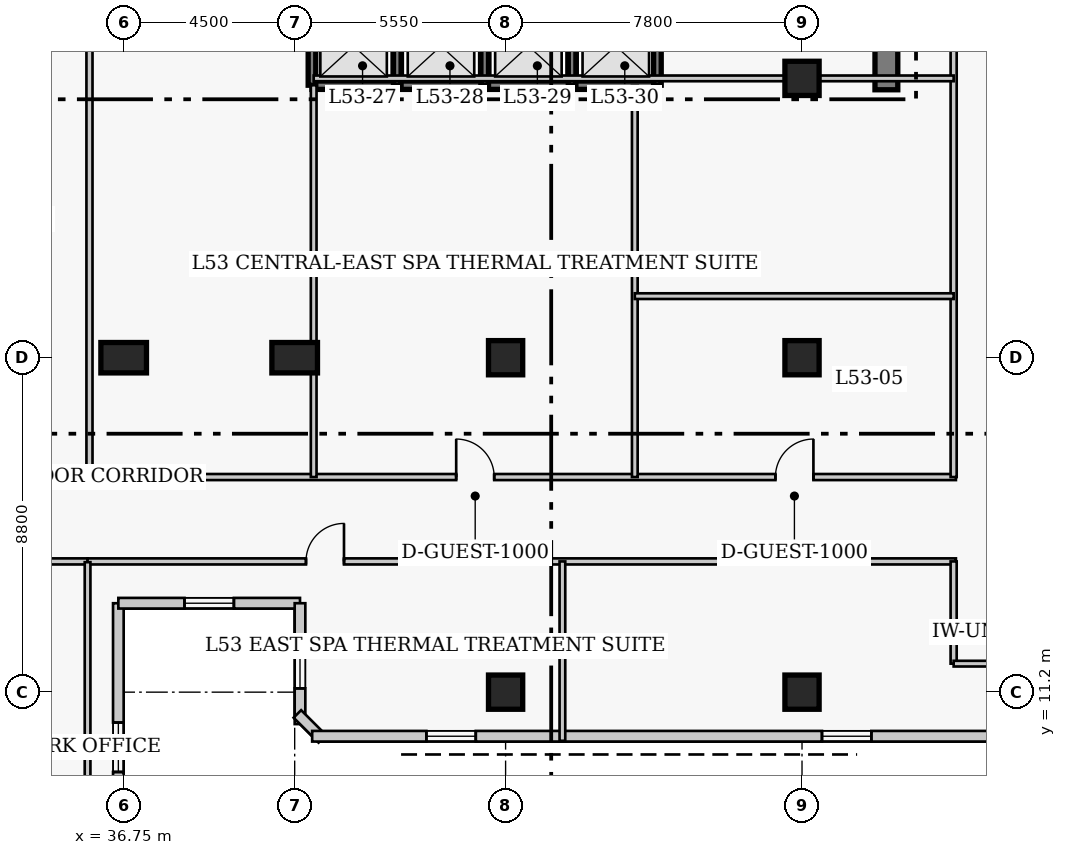
"""IFC4 building model, lengths in metres.
Left out: names, types, materials, properties, quantities, classifications, styles, units other than length and angle.
Written with IfcOpenShell. Run it as: python <this file> out.ifc"""

import sys

from ifc_helpers import new_model, si_unit, direction, frame, frame_2d, origin, origin_2d, place, context, subcontext, project, spatial, rectangle, extrude, element, fill, save


model = new_model("IFC4")
c1 = context("Model", 3, precision=1e-05, world=origin(), true_north=direction((0.0, 1.0)))
c2 = subcontext(c1, "Body", "Model", "MODEL_VIEW")
j1 = project(units=[si_unit("LENGTHUNIT", "METRE"), si_unit("PLANEANGLEUNIT", "RADIAN")], contexts=[c1])
p1 = place(None, origin())
s1 = spatial("IfcSite", under=j1, at=p1, CompositionType="ELEMENT")
p2 = place(p1, origin())
s2 = spatial("IfcBuilding", under=s1, at=p2, CompositionType="ELEMENT")
p3 = place(p2, frame((0.0, 0.0, 212.4)))
s3 = spatial("IfcBuildingStorey", under=s2, at=p3, CompositionType="ELEMENT", Elevation=212.4)
p4 = place(p3, frame((56.82, 27.05, 0.0), z_axis=(0.0, 0.0, 1.0), x_axis=(0.0, 1.0, 0.0)))
e1 = element("IfcWall", 1, at=p4, inside=s3, PredefinedType="SHEAR", context=c2, shape_type="SweptSolid", body=[
    extrude(rectangle(XDim=13.57, YDim=0.6, at=frame_2d((6.785, 0.0))), origin(), (0.0, 0.0, 1.0), 3.9),
])
for number, where, z_axis, x_axis in (
    (2, (36.75, 20.0, 0.0), (0.0, 0.0, 1.0), (1.0, 0.0, 0.0)),
    (3, (41.25, 20.0, 0.0), (0.0, 0.0, 1.0), (1.0, 0.0, 0.0)),
):
    element("IfcColumn", number, at=place(p3, frame(where, z_axis=z_axis, x_axis=x_axis)), inside=s3, PredefinedType="COLUMN", context=c2, shape_type="SweptSolid", body=[
        extrude(rectangle(XDim=1.2, YDim=0.8, at=origin_2d()), origin(), (0.0, 0.0, 1.0), 3.9),
    ])
for number, where, z_axis, x_axis in (
    (4, (46.8, 11.2, 0.0), (0.0, 0.0, 1.0), (1.0, 0.0, 0.0)),
    (5, (46.8, 20.0, 0.0), (0.0, 0.0, 1.0), (1.0, 0.0, 0.0)),
    (6, (54.6, 11.2, 0.0), (0.0, 0.0, 1.0), (1.0, 0.0, 0.0)),
    (7, (54.6, 20.0, 0.0), (0.0, 0.0, 1.0), (1.0, 0.0, 0.0)),
    (8, (54.6, 27.35, 0.0), (0.0, 0.0, 1.0), (1.0, 0.0, 0.0)),
):
    element("IfcColumn", number, at=place(p3, frame(where, z_axis=z_axis, x_axis=x_axis)), inside=s3, PredefinedType="COLUMN", context=c2, shape_type="SweptSolid", body=[
        extrude(rectangle(XDim=0.9, YDim=0.9, at=origin_2d()), origin(), (0.0, 0.0, 1.0), 3.9),
    ])
p5 = place(p3, frame((36.61, 5.96, 0.0), z_axis=(0.0, 0.0, 1.0), x_axis=(0.0, 1.0, 0.0)))
e9 = element("IfcWall", 9, at=p5, inside=s3, PredefinedType="SOLIDWALL", context=c2, shape_type="SweptSolid", body=[
    extrude(rectangle(XDim=7.58, YDim=0.28, at=frame_2d((3.79, 0.0))), origin(), (0.0, 0.0, 1.0), 3.65),
])
p6 = place(p5, frame((3.14, 0.0, 0.85)))
e10 = element("IfcOpeningElement", 10, at=p6, cuts=e9, PredefinedType="OPENING", context=c2, shape_type="SweptSolid", body=[
    extrude(rectangle(XDim=1.3, YDim=1.7, at=frame_2d((0.65, 0.85))), frame((0.0, 0.15, 0.0), z_axis=(0.0, -1.0, 0.0), x_axis=(1.0, 0.0, 0.0)), (0.0, 0.0, 1.0), 0.3),
])
p7 = place(p3, frame((36.61, 13.54, 0.0), z_axis=(0.0, 0.0, 1.0), x_axis=(1.0, 0.0, 0.0)))
e11 = element("IfcWall", 11, at=p7, inside=s3, PredefinedType="SOLIDWALL", context=c2, shape_type="SweptSolid", body=[
    extrude(rectangle(XDim=4.78, YDim=0.28, at=frame_2d((2.39, 0.0))), origin(), (0.0, 0.0, 1.0), 3.65),
])
p8 = place(p7, frame((1.74, 0.0, 0.85)))
e12 = element("IfcOpeningElement", 12, at=p8, cuts=e11, PredefinedType="OPENING", context=c2, shape_type="SweptSolid", body=[
    extrude(rectangle(XDim=1.3, YDim=1.7, at=frame_2d((0.65, 0.85))), frame((0.0, 0.15, 0.0), z_axis=(0.0, -1.0, 0.0), x_axis=(1.0, 0.0, 0.0)), (0.0, 0.0, 1.0), 0.3),
])
p9 = place(p3, frame((41.39, 13.54, 0.0), z_axis=(0.0, 0.0, 1.0), x_axis=(0.0, -1.0, 0.0)))
e13 = element("IfcWall", 13, at=p9, inside=s3, PredefinedType="SOLIDWALL", context=c2, shape_type="SweptSolid", body=[
    extrude(rectangle(XDim=3.18, YDim=0.28, at=frame_2d((1.59, 0.0))), origin(), (0.0, 0.0, 1.0), 3.65),
])
p10 = place(p9, frame((0.94, 0.0, 0.85)))
e14 = element("IfcOpeningElement", 14, at=p10, cuts=e13, PredefinedType="OPENING", context=c2, shape_type="SweptSolid", body=[
    extrude(rectangle(XDim=1.3, YDim=1.7, at=frame_2d((0.65, 0.85))), frame((0.0, 0.15, 0.0), z_axis=(0.0, -1.0, 0.0), x_axis=(1.0, 0.0, 0.0)), (0.0, 0.0, 1.0), 0.3),
])
p11 = place(p3, frame((41.321, 10.627, 0.0), z_axis=(0.0, 0.0, 1.0), x_axis=(0.707106781187, -0.707106781187, 0.0)))
e15 = element("IfcWall", 15, at=p11, inside=s3, PredefinedType="SOLIDWALL", context=c2, shape_type="SweptSolid", body=[
    extrude(rectangle(XDim=0.928, YDim=0.28, at=frame_2d((0.464, 0.0))), origin(), (0.0, 0.0, 1.0), 3.65),
])
p12 = place(p3, frame((41.71, 10.04, 0.0), z_axis=(0.0, 0.0, 1.0), x_axis=(1.0, 0.0, 0.0)))
e16 = element("IfcWall", 16, at=p12, inside=s3, PredefinedType="SOLIDWALL", context=c2, shape_type="SweptSolid", body=[
    extrude(rectangle(XDim=25.83, YDim=0.28, at=frame_2d((12.915, 0.0))), origin(), (0.0, 0.0, 1.0), 3.65),
])
p13 = place(p12, frame((3.005, 0.0, 0.85)))
e17 = element("IfcOpeningElement", 17, at=p13, cuts=e16, PredefinedType="OPENING", context=c2, shape_type="SweptSolid", body=[
    extrude(rectangle(XDim=1.3, YDim=1.7, at=frame_2d((0.65, 0.85))), frame((0.0, 0.15, 0.0), z_axis=(0.0, -1.0, 0.0), x_axis=(1.0, 0.0, 0.0)), (0.0, 0.0, 1.0), 0.3),
])
p14 = place(p12, frame((13.415, 0.0, 0.85)))
e18 = element("IfcOpeningElement", 18, at=p14, cuts=e16, PredefinedType="OPENING", context=c2, shape_type="SweptSolid", body=[
    extrude(rectangle(XDim=1.3, YDim=1.7, at=frame_2d((0.65, 0.85))), frame((0.0, 0.15, 0.0), z_axis=(0.0, -1.0, 0.0), x_axis=(1.0, 0.0, 0.0)), (0.0, 0.0, 1.0), 0.3),
])
p15 = place(p12, frame((21.525, 0.0, 0.85)))
e19 = element("IfcOpeningElement", 19, at=p15, cuts=e16, PredefinedType="OPENING", context=c2, shape_type="SweptSolid", body=[
    extrude(rectangle(XDim=1.3, YDim=1.7, at=frame_2d((0.65, 0.85))), frame((0.0, 0.15, 0.0), z_axis=(0.0, -1.0, 0.0), x_axis=(1.0, 0.0, 0.0)), (0.0, 0.0, 1.0), 0.3),
])
p16 = place(p3, frame((41.705, 27.17, 0.0), z_axis=(0.0, 0.0, 1.0), x_axis=(1.0, 0.0, 0.0)))
e20 = element("IfcWall", 20, at=p16, inside=s3, PredefinedType="SHEAR", context=c2, shape_type="SweptSolid", body=[
    extrude(rectangle(XDim=2.245, YDim=0.22, at=frame_2d((1.123, 0.0))), origin(), (0.0, 0.0, 1.0), 3.9),
])
p17 = place(p3, frame((41.705, 27.17, 0.0), z_axis=(0.0, 0.0, 1.0), x_axis=(0.0, 1.0, 0.0)))
e21 = element("IfcWall", 21, at=p17, inside=s3, PredefinedType="SHEAR", context=c2, shape_type="SweptSolid", body=[
    extrude(rectangle(XDim=2.06, YDim=0.2, at=frame_2d((1.03, 0.0))), origin(), (0.0, 0.0, 1.0), 3.9),
])
p18 = place(p3, frame((43.95, 27.17, 0.0), z_axis=(0.0, 0.0, 1.0), x_axis=(1.0, 0.0, 0.0)))
e22 = element("IfcWall", 22, at=p18, inside=s3, PredefinedType="SHEAR", context=c2, shape_type="SweptSolid", body=[
    extrude(rectangle(XDim=2.3, YDim=0.22, at=frame_2d((1.15, 0.0))), origin(), (0.0, 0.0, 1.0), 3.9),
])
p19 = place(p3, frame((43.95, 27.17, 0.0), z_axis=(0.0, 0.0, 1.0), x_axis=(0.0, 1.0, 0.0)))
e23 = element("IfcWall", 23, at=p19, inside=s3, PredefinedType="SHEAR", context=c2, shape_type="SweptSolid", body=[
    extrude(rectangle(XDim=2.06, YDim=0.2, at=frame_2d((1.03, 0.0))), origin(), (0.0, 0.0, 1.0), 3.9),
])
p20 = place(p3, frame((46.25, 27.17, 0.0), z_axis=(0.0, 0.0, 1.0), x_axis=(1.0, 0.0, 0.0)))
e24 = element("IfcWall", 24, at=p20, inside=s3, PredefinedType="SHEAR", context=c2, shape_type="SweptSolid", body=[
    extrude(rectangle(XDim=2.3, YDim=0.22, at=frame_2d((1.15, 0.0))), origin(), (0.0, 0.0, 1.0), 3.9),
])
p21 = place(p3, frame((46.25, 27.17, 0.0), z_axis=(0.0, 0.0, 1.0), x_axis=(0.0, 1.0, 0.0)))
e25 = element("IfcWall", 25, at=p21, inside=s3, PredefinedType="SHEAR", context=c2, shape_type="SweptSolid", body=[
    extrude(rectangle(XDim=2.06, YDim=0.2, at=frame_2d((1.03, 0.0))), origin(), (0.0, 0.0, 1.0), 3.9),
])
p22 = place(p3, frame((48.55, 27.17, 0.0), z_axis=(0.0, 0.0, 1.0), x_axis=(1.0, 0.0, 0.0)))
e26 = element("IfcWall", 26, at=p22, inside=s3, PredefinedType="SHEAR", context=c2, shape_type="SweptSolid", body=[
    extrude(rectangle(XDim=2.245, YDim=0.22, at=frame_2d((1.123, 0.0))), origin(), (0.0, 0.0, 1.0), 3.9),
])
for number, where, z_axis, x_axis in (
    (27, (48.55, 27.17, 0.0), (0.0, 0.0, 1.0), (0.0, 1.0, 0.0)),
    (28, (50.795, 27.17, 0.0), (0.0, 0.0, 1.0), (0.0, 1.0, 0.0)),
):
    element("IfcWall", number, at=place(p3, frame(where, z_axis=z_axis, x_axis=x_axis)), inside=s3, PredefinedType="SHEAR", context=c2, shape_type="SweptSolid", body=[
        extrude(rectangle(XDim=2.06, YDim=0.2, at=frame_2d((1.03, 0.0))), origin(), (0.0, 0.0, 1.0), 3.9),
    ])
p23 = place(p3, frame((35.85, 16.86, 0.0), z_axis=(0.0, 0.0, 1.0), x_axis=(1.0, 0.0, 0.0)))
e29 = element("IfcWall", 29, at=p23, inside=s3, PredefinedType="PARTITIONING", context=c2, shape_type="SweptSolid", body=[
    extrude(rectangle(XDim=22.8, YDim=0.16, at=frame_2d((11.4, 0.0))), origin(), (0.0, 0.0, 1.0), 3.65),
])
p24 = place(p23, frame((9.65, 0.0, 0.0)))
e30 = element("IfcOpeningElement", 30, at=p24, cuts=e29, PredefinedType="OPENING", context=c2, shape_type="SweptSolid", body=[
    extrude(rectangle(XDim=1.0, YDim=2.15, at=frame_2d((0.5, 1.075))), frame((0.0, 0.09, 0.0), z_axis=(0.0, -1.0, 0.0), x_axis=(1.0, 0.0, 0.0)), (0.0, 0.0, 1.0), 0.18),
])
p25 = place(p23, frame((18.05, 0.0, 0.0)))
e31 = element("IfcOpeningElement", 31, at=p25, cuts=e29, PredefinedType="OPENING", context=c2, shape_type="SweptSolid", body=[
    extrude(rectangle(XDim=1.0, YDim=2.15, at=frame_2d((0.5, 1.075))), frame((0.0, 0.09, 0.0), z_axis=(0.0, -1.0, 0.0), x_axis=(1.0, 0.0, 0.0)), (0.0, 0.0, 1.0), 0.18),
])
p26 = place(p3, frame((35.85, 16.86, 0.0), z_axis=(0.0, 0.0, 1.0), x_axis=(0.0, 1.0, 0.0)))
e32 = element("IfcWall", 32, at=p26, inside=s3, PredefinedType="PARTITIONING", context=c2, shape_type="SweptSolid", body=[
    extrude(rectangle(XDim=12.69, YDim=0.16, at=frame_2d((6.345, 0.0))), origin(), (0.0, 0.0, 1.0), 3.65),
])
p27 = place(p3, frame((18.8, 14.64, 0.0), z_axis=(0.0, 0.0, 1.0), x_axis=(1.0, 0.0, 0.0)))
e33 = element("IfcWall", 33, at=p27, inside=s3, PredefinedType="PARTITIONING", context=c2, shape_type="SweptSolid", body=[
    extrude(rectangle(XDim=17.0, YDim=0.16, at=frame_2d((8.5, 0.0))), origin(), (0.0, 0.0, 1.0), 3.65),
])
p28 = place(p27, frame((4.95, 0.0, 0.0)))
e34 = element("IfcOpeningElement", 34, at=p28, cuts=e33, PredefinedType="OPENING", context=c2, shape_type="SweptSolid", body=[
    extrude(rectangle(XDim=1.0, YDim=2.15, at=frame_2d((0.5, 1.075))), frame((0.0, 0.09, 0.0), z_axis=(0.0, -1.0, 0.0), x_axis=(1.0, 0.0, 0.0)), (0.0, 0.0, 1.0), 0.18),
])
p29 = place(p27, frame((12.265, 0.0, 0.0)))
e35 = element("IfcOpeningElement", 35, at=p29, cuts=e33, PredefinedType="OPENING", context=c2, shape_type="SweptSolid", body=[
    extrude(rectangle(XDim=1.0, YDim=2.15, at=frame_2d((0.5, 1.075))), frame((0.0, 0.09, 0.0), z_axis=(0.0, -1.0, 0.0), x_axis=(1.0, 0.0, 0.0)), (0.0, 0.0, 1.0), 0.18),
])
p30 = place(p3, frame((35.8, 14.64, 0.0), z_axis=(0.0, 0.0, 1.0), x_axis=(1.0, 0.0, 0.0)))
e36 = element("IfcWall", 36, at=p30, inside=s3, PredefinedType="PARTITIONING", context=c2, shape_type="SweptSolid", body=[
    extrude(rectangle(XDim=22.85, YDim=0.16, at=frame_2d((11.425, 0.0))), origin(), (0.0, 0.0, 1.0), 3.65),
])
p31 = place(p30, frame((5.748, 0.0, 0.0)))
e37 = element("IfcOpeningElement", 37, at=p31, cuts=e36, PredefinedType="OPENING", context=c2, shape_type="SweptSolid", body=[
    extrude(rectangle(XDim=1.0, YDim=2.15, at=frame_2d((0.5, 1.075))), frame((0.0, 0.09, 0.0), z_axis=(0.0, -1.0, 0.0), x_axis=(1.0, 0.0, 0.0)), (0.0, 0.0, 1.0), 0.18),
])
p32 = place(p3, frame((58.59, 16.86, 0.0), z_axis=(0.0, 0.0, 1.0), x_axis=(0.0, 1.0, 0.0)))
e38 = element("IfcWall", 38, at=p32, inside=s3, PredefinedType="PARTITIONING", context=c2, shape_type="SweptSolid", body=[
    extrude(rectangle(XDim=23.79, YDim=0.16, at=frame_2d((11.895, 0.0))), origin(), (0.0, 0.0, 1.0), 3.246),
])
p33 = place(p3, frame((58.59, 11.95, 0.0), z_axis=(0.0, 0.0, 1.0), x_axis=(0.0, 1.0, 0.0)))
e39 = element("IfcWall", 39, at=p33, inside=s3, PredefinedType="PARTITIONING", context=c2, shape_type="SweptSolid", body=[
    extrude(rectangle(XDim=2.69, YDim=0.16, at=frame_2d((1.345, 0.0))), origin(), (0.0, 0.0, 1.0), 3.246),
])
p34 = place(p3, frame((58.59, 11.95, 0.0), z_axis=(0.0, 0.0, 1.0), x_axis=(1.0, 0.0, 0.0)))
e40 = element("IfcWall", 40, at=p34, inside=s3, PredefinedType="PARTITIONING", context=c2, shape_type="SweptSolid", body=[
    extrude(rectangle(XDim=2.22, YDim=0.15, at=frame_2d((1.11, 0.0))), origin(), (0.0, 0.0, 1.0), 3.65),
])
p35 = place(p3, frame((41.75, 16.86, 0.0), z_axis=(0.0, 0.0, 1.0), x_axis=(0.0, 1.0, 0.0)))
e41 = element("IfcWall", 41, at=p35, inside=s3, PredefinedType="PARTITIONING", context=c2, shape_type="SweptSolid", body=[
    extrude(rectangle(XDim=10.31, YDim=0.15, at=frame_2d((5.155, 0.0))), origin(), (0.0, 0.0, 1.0), 3.65),
])
p36 = place(p3, frame((50.2, 16.86, 0.0), z_axis=(0.0, 0.0, 1.0), x_axis=(0.0, 1.0, 0.0)))
e42 = element("IfcWall", 42, at=p36, inside=s3, PredefinedType="PARTITIONING", context=c2, shape_type="SweptSolid", body=[
    extrude(rectangle(XDim=10.29, YDim=0.15, at=frame_2d((5.145, 0.0))), origin(), (0.0, 0.0, 1.0), 3.65),
])
p37 = place(p3, frame((41.75, 27.35, 0.0), z_axis=(0.0, 0.0, 1.0), x_axis=(1.0, 0.0, 0.0)))
e43 = element("IfcWall", 43, at=p37, inside=s3, PredefinedType="PARTITIONING", context=c2, shape_type="SweptSolid", body=[
    extrude(rectangle(XDim=16.84, YDim=0.15, at=frame_2d((8.42, 0.0))), origin(), (0.0, 0.0, 1.0), 3.65),
])
p38 = place(p3, frame((50.2, 21.62, 0.0), z_axis=(0.0, 0.0, 1.0), x_axis=(1.0, 0.0, 0.0)))
e44 = element("IfcWall", 44, at=p38, inside=s3, PredefinedType="PARTITIONING", context=c2, shape_type="SweptSolid", body=[
    extrude(rectangle(XDim=8.39, YDim=0.15, at=frame_2d((4.195, 0.0))), origin(), (0.0, 0.0, 1.0), 3.65),
])
p39 = place(p3, frame((35.8, 5.52, 0.0), z_axis=(0.0, 0.0, 1.0), x_axis=(0.0, 1.0, 0.0)))
e45 = element("IfcWall", 45, at=p39, inside=s3, PredefinedType="PARTITIONING", context=c2, shape_type="SweptSolid", body=[
    extrude(rectangle(XDim=9.1, YDim=0.15, at=frame_2d((4.55, 0.0))), origin(), (0.0, 0.0, 1.0), 3.65),
])
p40 = place(p3, frame((48.295, 9.92, 0.0), z_axis=(0.0, 0.0, 1.0), x_axis=(0.0, 1.0, 0.0)))
e46 = element("IfcWall", 46, at=p40, inside=s3, PredefinedType="PARTITIONING", context=c2, shape_type="SweptSolid", body=[
    extrude(rectangle(XDim=4.72, YDim=0.15, at=frame_2d((2.36, 0.0))), origin(), (0.0, 0.0, 1.0), 3.65),
])
p41 = place(p6, origin())
e47 = element("IfcWindow", 47, at=p41, inside=s3, PartitioningType="SINGLE_PANEL", PredefinedType="WINDOW", context=c2, shape_type="SweptSolid", body=[
    extrude(rectangle(XDim=1.3, YDim=1.7, at=frame_2d((0.65, 0.85))), frame((0.0, 0.03, 0.0), z_axis=(0.0, -1.0, 0.0), x_axis=(1.0, 0.0, 0.0)), (0.0, 0.0, 1.0), 0.06),
])
fill(e10, e47)
p42 = place(p8, origin())
e48 = element("IfcWindow", 48, at=p42, inside=s3, PartitioningType="SINGLE_PANEL", PredefinedType="WINDOW", context=c2, shape_type="SweptSolid", body=[
    extrude(rectangle(XDim=1.3, YDim=1.7, at=frame_2d((0.65, 0.85))), frame((0.0, 0.03, 0.0), z_axis=(0.0, -1.0, 0.0), x_axis=(1.0, 0.0, 0.0)), (0.0, 0.0, 1.0), 0.06),
])
fill(e12, e48)
p43 = place(p10, origin())
e49 = element("IfcWindow", 49, at=p43, inside=s3, PartitioningType="SINGLE_PANEL", PredefinedType="WINDOW", context=c2, shape_type="SweptSolid", body=[
    extrude(rectangle(XDim=1.3, YDim=1.7, at=frame_2d((0.65, 0.85))), frame((0.0, 0.03, 0.0), z_axis=(0.0, -1.0, 0.0), x_axis=(1.0, 0.0, 0.0)), (0.0, 0.0, 1.0), 0.06),
])
fill(e14, e49)
p44 = place(p13, origin())
e50 = element("IfcWindow", 50, at=p44, inside=s3, PartitioningType="SINGLE_PANEL", PredefinedType="WINDOW", context=c2, shape_type="SweptSolid", body=[
    extrude(rectangle(XDim=1.3, YDim=1.7, at=frame_2d((0.65, 0.85))), frame((0.0, 0.03, 0.0), z_axis=(0.0, -1.0, 0.0), x_axis=(1.0, 0.0, 0.0)), (0.0, 0.0, 1.0), 0.06),
])
fill(e17, e50)
p45 = place(p14, origin())
e51 = element("IfcWindow", 51, at=p45, inside=s3, PartitioningType="SINGLE_PANEL", PredefinedType="WINDOW", context=c2, shape_type="SweptSolid", body=[
    extrude(rectangle(XDim=1.3, YDim=1.7, at=frame_2d((0.65, 0.85))), frame((0.0, 0.03, 0.0), z_axis=(0.0, -1.0, 0.0), x_axis=(1.0, 0.0, 0.0)), (0.0, 0.0, 1.0), 0.06),
])
fill(e18, e51)
p46 = place(p24, origin())
e52 = element("IfcDoor", 52, at=p46, inside=s3, OperationType="SINGLE_SWING_LEFT", PredefinedType="DOOR", context=c2, shape_type="SweptSolid", body=[
    extrude(rectangle(XDim=1.0, YDim=2.15, at=frame_2d((0.5, 1.075))), frame((0.0, 0.025, 0.0), z_axis=(0.0, -1.0, 0.0), x_axis=(1.0, 0.0, 0.0)), (0.0, 0.0, 1.0), 0.05),
])
fill(e30, e52)
p47 = place(p25, origin())
e53 = element("IfcDoor", 53, at=p47, inside=s3, OperationType="SINGLE_SWING_RIGHT", PredefinedType="DOOR", context=c2, shape_type="SweptSolid", body=[
    extrude(rectangle(XDim=1.0, YDim=2.15, at=frame_2d((0.5, 1.075))), frame((0.0, 0.025, 0.0), z_axis=(0.0, -1.0, 0.0), x_axis=(1.0, 0.0, 0.0)), (0.0, 0.0, 1.0), 0.05),
])
fill(e31, e53)
p48 = place(p31, origin())
e54 = element("IfcDoor", 54, at=p48, inside=s3, OperationType="SINGLE_SWING_RIGHT", PredefinedType="DOOR", context=c2, shape_type="SweptSolid", body=[
    extrude(rectangle(XDim=1.0, YDim=2.15, at=frame_2d((0.5, 1.075))), frame((0.0, 0.025, 0.0), z_axis=(0.0, -1.0, 0.0), x_axis=(1.0, 0.0, 0.0)), (0.0, 0.0, 1.0), 0.05),
])
fill(e37, e54)
save(model, sys.argv[1])
